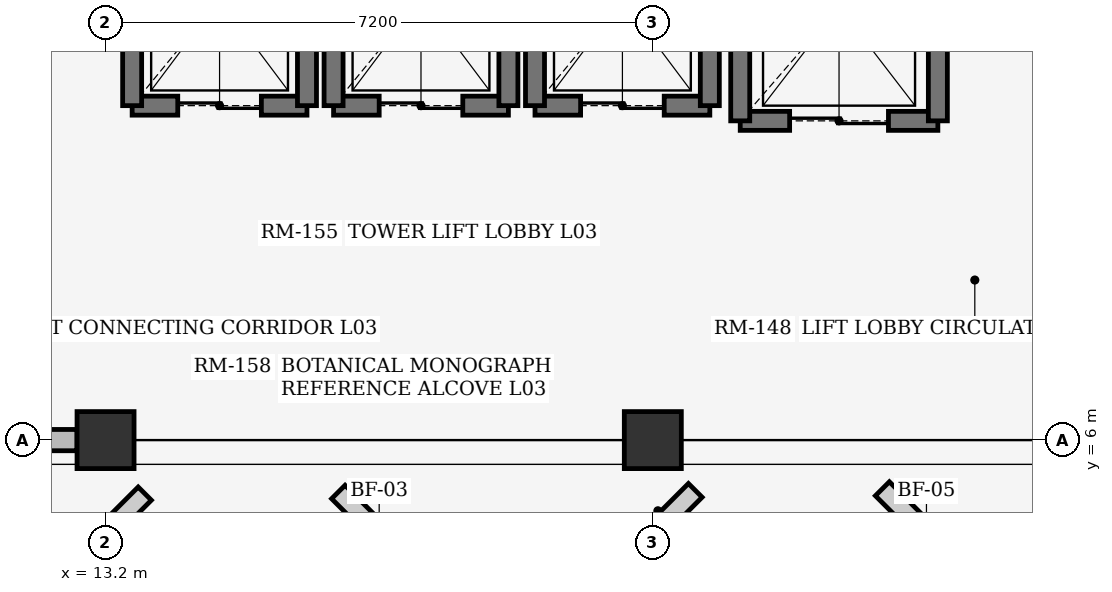
"""IFC4 building model, lengths in metres.
Left out: names, types, materials, properties, quantities, classifications, styles, units other than length and angle.
Written with IfcOpenShell. Run it as: python <this file> out.ifc"""

import sys

from ifc_helpers import new_model, si_unit, direction, frame, frame_2d, origin, origin_2d, place, context, subcontext, project, spatial, rectangle, extrude, element, fill, save


model = new_model("IFC4")
c1 = context("Model", 3, precision=1e-05, world=origin(), true_north=direction((0.0, 1.0)))
c2 = subcontext(c1, "Body", "Model", "MODEL_VIEW")
j1 = project(units=[si_unit("LENGTHUNIT", "METRE"), si_unit("PLANEANGLEUNIT", "RADIAN")], contexts=[c1])
p1 = place(None, origin())
s1 = spatial("IfcSite", under=j1, at=p1, CompositionType="ELEMENT")
p2 = place(p1, origin())
s2 = spatial("IfcBuilding", under=s1, at=p2, CompositionType="ELEMENT")
p3 = place(p2, frame((0.0, 0.0, 13.2)))
s3 = spatial("IfcBuildingStorey", under=s2, at=p3, CompositionType="ELEMENT", Elevation=13.2)
for number, where, z_axis, x_axis in (
    (1, (13.2, 6.0, 0.0), (0.0, 0.0, 1.0), (1.0, 0.0, 0.0)),
    (2, (20.4, 6.0, 0.0), (0.0, 0.0, 1.0), (1.0, 0.0, 0.0)),
):
    element("IfcColumn", number, at=place(p3, frame(where, z_axis=z_axis, x_axis=x_axis)), inside=s3, PredefinedType="COLUMN", context=c2, shape_type="SweptSolid", body=[
        extrude(rectangle(XDim=0.75, YDim=0.75, at=origin_2d()), origin(), (0.0, 0.0, 1.0), 3.635),
    ])
p4 = place(p3, frame((6.375, 6.0, 0.0), z_axis=(0.0, 0.0, 1.0), x_axis=(1.0, 0.0, 0.0)))
e3 = element("IfcWall", 3, at=p4, inside=s3, PredefinedType="STANDARD", context=c2, shape_type="SweptSolid", body=[
    extrude(rectangle(XDim=6.45, YDim=0.28, at=frame_2d((3.225, 0.0))), origin(), (0.0, 0.0, 1.0), 3.015),
])
p5 = place(p4, frame((2.1, 0.0, 0.75)))
e4 = element("IfcOpeningElement", 4, at=p5, cuts=e3, PredefinedType="OPENING", context=c2, shape_type="SweptSolid", body=[
    extrude(rectangle(XDim=2.25, YDim=1.5, at=frame_2d((1.125, 0.75))), frame((0.0, 0.15, 0.0), z_axis=(0.0, -1.0, 0.0), x_axis=(1.0, 0.0, 0.0)), (0.0, 0.0, 1.0), 0.3),
])
p6 = place(p3, frame((13.55, 10.4, 0.0), z_axis=(0.0, 0.0, 1.0), x_axis=(1.0, 0.0, 0.0)))
e5 = element("IfcWall", 5, at=p6, inside=s3, PredefinedType="SHEAR", context=c2, shape_type="SweptSolid", body=[
    extrude(rectangle(XDim=2.3, YDim=0.25, at=frame_2d((1.15, 0.0))), origin(), (0.0, 0.0, 1.0), 3.635),
])
p7 = place(p6, frame((0.6, 0.0, 0.0)))
e6 = element("IfcOpeningElement", 6, at=p7, cuts=e5, PredefinedType="OPENING", context=c2, shape_type="SweptSolid", body=[
    extrude(rectangle(XDim=1.1, YDim=2.2, at=frame_2d((0.55, 1.1))), frame((0.0, 0.135, 0.0), z_axis=(0.0, -1.0, 0.0), x_axis=(1.0, 0.0, 0.0)), (0.0, 0.0, 1.0), 0.27),
])
for number, where, z_axis, x_axis in (
    (7, (13.55, 10.4, 0.0), (0.0, 0.0, 1.0), (0.0, 1.0, 0.0)),
    (8, (15.85, 10.4, 0.0), (0.0, 0.0, 1.0), (0.0, 1.0, 0.0)),
):
    element("IfcWall", number, at=place(p3, frame(where, z_axis=z_axis, x_axis=x_axis)), inside=s3, PredefinedType="SHEAR", context=c2, shape_type="SweptSolid", body=[
        extrude(rectangle(XDim=2.8, YDim=0.25, at=frame_2d((1.4, 0.0))), origin(), (0.0, 0.0, 1.0), 3.635),
    ])
p8 = place(p3, frame((16.2, 10.4, 0.0), z_axis=(0.0, 0.0, 1.0), x_axis=(1.0, 0.0, 0.0)))
e9 = element("IfcWall", 9, at=p8, inside=s3, PredefinedType="SHEAR", context=c2, shape_type="SweptSolid", body=[
    extrude(rectangle(XDim=2.3, YDim=0.25, at=frame_2d((1.15, 0.0))), origin(), (0.0, 0.0, 1.0), 3.635),
])
p9 = place(p8, frame((0.6, 0.0, 0.0)))
e10 = element("IfcOpeningElement", 10, at=p9, cuts=e9, PredefinedType="OPENING", context=c2, shape_type="SweptSolid", body=[
    extrude(rectangle(XDim=1.1, YDim=2.2, at=frame_2d((0.55, 1.1))), frame((0.0, 0.135, 0.0), z_axis=(0.0, -1.0, 0.0), x_axis=(1.0, 0.0, 0.0)), (0.0, 0.0, 1.0), 0.27),
])
for number, where, z_axis, x_axis in (
    (11, (16.2, 10.4, 0.0), (0.0, 0.0, 1.0), (0.0, 1.0, 0.0)),
    (12, (18.5, 10.4, 0.0), (0.0, 0.0, 1.0), (0.0, 1.0, 0.0)),
):
    element("IfcWall", number, at=place(p3, frame(where, z_axis=z_axis, x_axis=x_axis)), inside=s3, PredefinedType="SHEAR", context=c2, shape_type="SweptSolid", body=[
        extrude(rectangle(XDim=2.8, YDim=0.25, at=frame_2d((1.4, 0.0))), origin(), (0.0, 0.0, 1.0), 3.635),
    ])
p10 = place(p3, frame((18.85, 10.4, 0.0), z_axis=(0.0, 0.0, 1.0), x_axis=(1.0, 0.0, 0.0)))
e13 = element("IfcWall", 13, at=p10, inside=s3, PredefinedType="SHEAR", context=c2, shape_type="SweptSolid", body=[
    extrude(rectangle(XDim=2.3, YDim=0.25, at=frame_2d((1.15, 0.0))), origin(), (0.0, 0.0, 1.0), 3.635),
])
p11 = place(p10, frame((0.6, 0.0, 0.0)))
e14 = element("IfcOpeningElement", 14, at=p11, cuts=e13, PredefinedType="OPENING", context=c2, shape_type="SweptSolid", body=[
    extrude(rectangle(XDim=1.1, YDim=2.2, at=frame_2d((0.55, 1.1))), frame((0.0, 0.135, 0.0), z_axis=(0.0, -1.0, 0.0), x_axis=(1.0, 0.0, 0.0)), (0.0, 0.0, 1.0), 0.27),
])
for number, where, z_axis, x_axis in (
    (15, (18.85, 10.4, 0.0), (0.0, 0.0, 1.0), (0.0, 1.0, 0.0)),
    (16, (21.15, 10.4, 0.0), (0.0, 0.0, 1.0), (0.0, 1.0, 0.0)),
):
    element("IfcWall", number, at=place(p3, frame(where, z_axis=z_axis, x_axis=x_axis)), inside=s3, PredefinedType="SHEAR", context=c2, shape_type="SweptSolid", body=[
        extrude(rectangle(XDim=2.8, YDim=0.25, at=frame_2d((1.4, 0.0))), origin(), (0.0, 0.0, 1.0), 3.635),
    ])
p12 = place(p3, frame((21.55, 10.2, 0.0), z_axis=(0.0, 0.0, 1.0), x_axis=(1.0, 0.0, 0.0)))
e17 = element("IfcWall", 17, at=p12, inside=s3, PredefinedType="SHEAR", context=c2, shape_type="SweptSolid", body=[
    extrude(rectangle(XDim=2.6, YDim=0.25, at=frame_2d((1.3, 0.0))), origin(), (0.0, 0.0, 1.0), 3.635),
])
p13 = place(p12, frame((0.65, 0.0, 0.0)))
e18 = element("IfcOpeningElement", 18, at=p13, cuts=e17, PredefinedType="OPENING", context=c2, shape_type="SweptSolid", body=[
    extrude(rectangle(XDim=1.3, YDim=2.25, at=frame_2d((0.65, 1.125))), frame((0.0, 0.135, 0.0), z_axis=(0.0, -1.0, 0.0), x_axis=(1.0, 0.0, 0.0)), (0.0, 0.0, 1.0), 0.27),
])
for number, where, z_axis, x_axis in (
    (19, (21.55, 10.2, 0.0), (0.0, 0.0, 1.0), (0.0, 1.0, 0.0)),
    (20, (24.15, 10.2, 0.0), (0.0, 0.0, 1.0), (0.0, 1.0, 0.0)),
):
    element("IfcWall", number, at=place(p3, frame(where, z_axis=z_axis, x_axis=x_axis)), inside=s3, PredefinedType="SHEAR", context=c2, shape_type="SweptSolid", body=[
        extrude(rectangle(XDim=3.0, YDim=0.25, at=frame_2d((1.5, 0.0))), origin(), (0.0, 0.0, 1.0), 3.635),
    ])
p14 = place(p7, origin())
e21 = element("IfcDoor", 21, at=p14, inside=s3, OperationType="DOUBLE_DOOR_SLIDING", PredefinedType="DOOR", context=c2, shape_type="SweptSolid", body=[
    extrude(rectangle(XDim=1.1, YDim=2.2, at=frame_2d((0.55, 1.1))), frame((0.0, 0.025, 0.0), z_axis=(0.0, -1.0, 0.0), x_axis=(1.0, 0.0, 0.0)), (0.0, 0.0, 1.0), 0.05),
])
fill(e6, e21)
p15 = place(p9, origin())
e22 = element("IfcDoor", 22, at=p15, inside=s3, OperationType="DOUBLE_DOOR_SLIDING", PredefinedType="DOOR", context=c2, shape_type="SweptSolid", body=[
    extrude(rectangle(XDim=1.1, YDim=2.2, at=frame_2d((0.55, 1.1))), frame((0.0, 0.025, 0.0), z_axis=(0.0, -1.0, 0.0), x_axis=(1.0, 0.0, 0.0)), (0.0, 0.0, 1.0), 0.05),
])
fill(e10, e22)
p16 = place(p11, origin())
e23 = element("IfcDoor", 23, at=p16, inside=s3, OperationType="DOUBLE_DOOR_SLIDING", PredefinedType="DOOR", context=c2, shape_type="SweptSolid", body=[
    extrude(rectangle(XDim=1.1, YDim=2.2, at=frame_2d((0.55, 1.1))), frame((0.0, 0.025, 0.0), z_axis=(0.0, -1.0, 0.0), x_axis=(1.0, 0.0, 0.0)), (0.0, 0.0, 1.0), 0.05),
])
fill(e14, e23)
p17 = place(p13, origin())
e24 = element("IfcDoor", 24, at=p17, inside=s3, OperationType="DOUBLE_DOOR_SLIDING", PredefinedType="DOOR", context=c2, shape_type="SweptSolid", body=[
    extrude(rectangle(XDim=1.3, YDim=2.25, at=frame_2d((0.65, 1.125))), frame((0.0, 0.025, 0.0), z_axis=(0.0, -1.0, 0.0), x_axis=(1.0, 0.0, 0.0)), (0.0, 0.0, 1.0), 0.05),
])
fill(e18, e24)
save(model, sys.argv[1])
